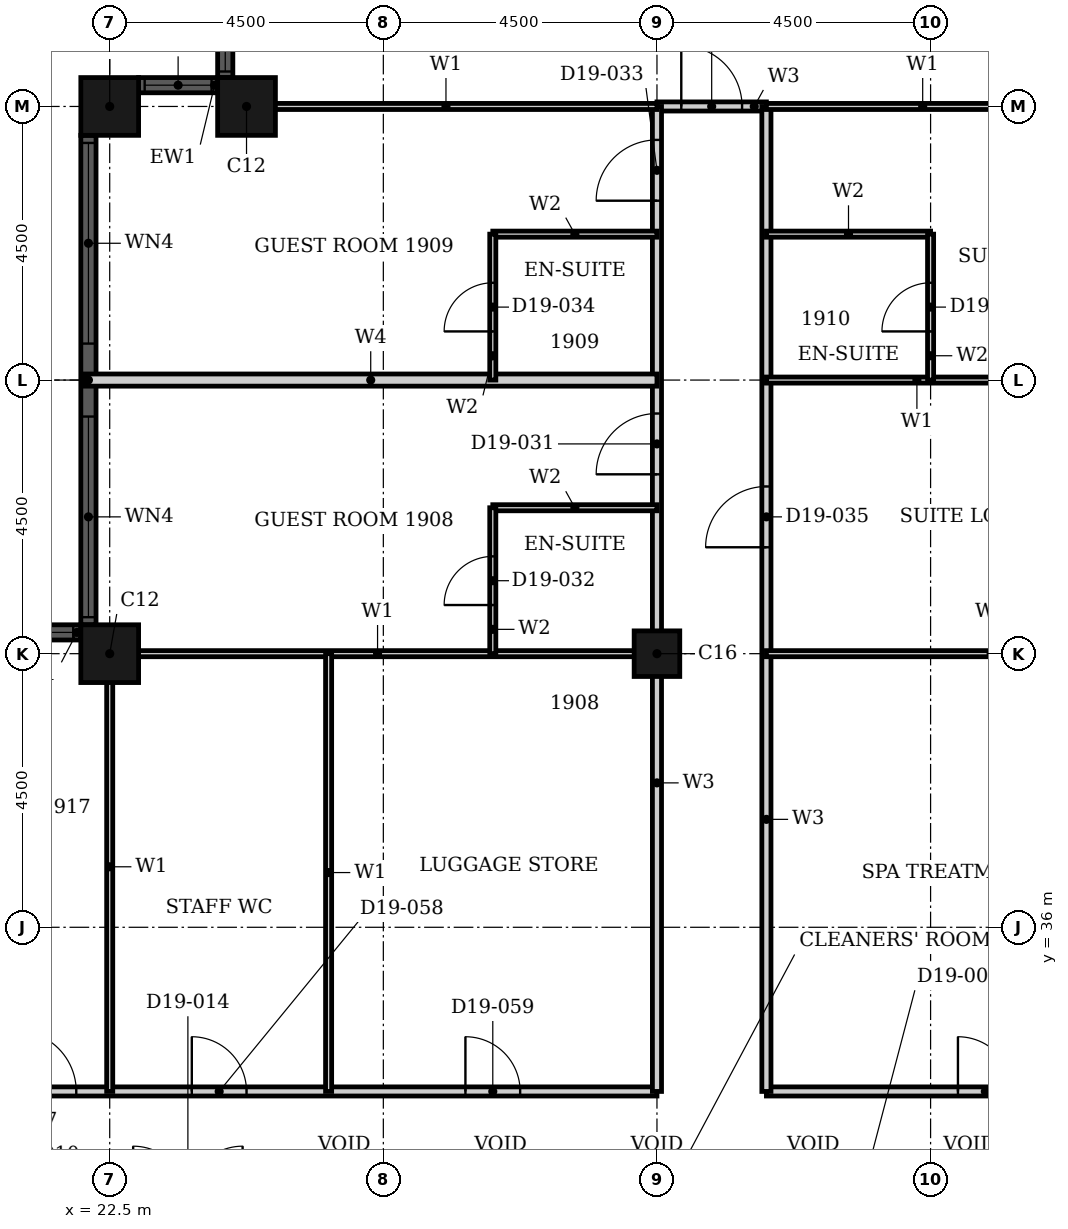
"""IFC4 building model, lengths in metres.
Left out: names, types, materials, properties, quantities, classifications, styles, units other than length and angle.
Written with IfcOpenShell. Run it as: python <this file> out.ifc"""

import sys

from ifc_helpers import new_model, si_unit, direction, frame, frame_2d, origin, origin_2d, place, context, subcontext, project, spatial, rectangle, hollow_rectangle, extrude, element, fill, save


model = new_model("IFC4")
c1 = context("Model", 3, precision=1e-05, world=origin(), true_north=direction((0.0, 1.0)))
c2 = subcontext(c1, "Body", "Model", "MODEL_VIEW")
j1 = project(units=[si_unit("LENGTHUNIT", "METRE"), si_unit("PLANEANGLEUNIT", "RADIAN")], contexts=[c1])
p1 = place(None, origin())
s1 = spatial("IfcSite", under=j1, at=p1, CompositionType="ELEMENT")
p2 = place(p1, origin())
s2 = spatial("IfcBuilding", under=s1, at=p2, CompositionType="ELEMENT")
p3 = place(p2, frame((0.0, 0.0, 81.6)))
s3 = spatial("IfcBuildingStorey", under=s2, at=p3, CompositionType="ELEMENT", Elevation=81.6)
for number, where, z_axis, x_axis in (
    (1, (24.75, 49.5, 0.0), (0.0, 0.0, 1.0), (1.0, 0.0, 0.0)),
    (2, (22.5, 49.5, 0.0), (0.0, 0.0, 1.0), (1.0, 0.0, 0.0)),
    (3, (22.5, 40.5, 0.0), (0.0, 0.0, 1.0), (1.0, 0.0, 0.0)),
):
    element("IfcColumn", number, at=place(p3, frame(where, z_axis=z_axis, x_axis=x_axis)), inside=s3, PredefinedType="COLUMN", context=c2, shape_type="SweptSolid", body=[
        extrude(hollow_rectangle(XDim=0.95, YDim=0.95, WallThickness=0.03, at=origin_2d()), origin(), (0.0, 0.0, 1.0), 3.6),
    ])
p4 = place(p3, frame((31.5, 40.5, 0.0), z_axis=(0.0, 0.0, 1.0), x_axis=(1.0, 0.0, 0.0)))
e4 = element("IfcColumn", 4, at=p4, inside=s3, PredefinedType="COLUMN", context=c2, shape_type="SweptSolid", body=[
    extrude(hollow_rectangle(XDim=0.75, YDim=0.75, WallThickness=0.024, at=origin_2d()), origin(), (0.0, 0.0, 1.0), 3.6),
])
p5 = place(p3, frame((24.4, 51.275, 0.0), z_axis=(0.0, 0.0, 1.0), x_axis=(0.0, -1.0, 0.0)))
e5 = element("IfcWall", 5, at=p5, inside=s3, PredefinedType="SOLIDWALL", context=c2, shape_type="SweptSolid", body=[
    extrude(rectangle(XDim=1.3, YDim=0.25, at=frame_2d((0.65, 0.0))), origin(), (0.0, 0.0, 1.0), 3.6),
])
p6 = place(p5, frame((0.1, 0.0, 0.9)))
e6 = element("IfcOpeningElement", 6, at=p6, cuts=e5, PredefinedType="OPENING", context=c2, shape_type="SweptSolid", body=[
    extrude(rectangle(XDim=1.1, YDim=2.08, at=frame_2d((0.55, 1.04))), frame((0.0, 0.135, 0.0), z_axis=(0.0, -1.0, 0.0), x_axis=(1.0, 0.0, 0.0)), (0.0, 0.0, 1.0), 0.27),
])
p7 = place(p3, frame((24.275, 49.85, 0.0), z_axis=(0.0, 0.0, 1.0), x_axis=(-1.0, 0.0, 0.0)))
e7 = element("IfcWall", 7, at=p7, inside=s3, PredefinedType="SOLIDWALL", context=c2, shape_type="SweptSolid", body=[
    extrude(rectangle(XDim=1.3, YDim=0.25, at=frame_2d((0.65, 0.0))), origin(), (0.0, 0.0, 1.0), 3.6),
])
p8 = place(p7, frame((0.1, 0.0, 0.9)))
e8 = element("IfcOpeningElement", 8, at=p8, cuts=e7, PredefinedType="OPENING", context=c2, shape_type="SweptSolid", body=[
    extrude(rectangle(XDim=1.1, YDim=2.08, at=frame_2d((0.55, 1.04))), frame((0.0, 0.135, 0.0), z_axis=(0.0, -1.0, 0.0), x_axis=(1.0, 0.0, 0.0)), (0.0, 0.0, 1.0), 0.27),
])
p9 = place(p3, frame((22.15, 49.025, 0.0), z_axis=(0.0, 0.0, 1.0), x_axis=(0.0, -1.0, 0.0)))
e9 = element("IfcWall", 9, at=p9, inside=s3, PredefinedType="SOLIDWALL", context=c2, shape_type="SweptSolid", body=[
    extrude(rectangle(XDim=8.05, YDim=0.25, at=frame_2d((4.025, 0.0))), origin(), (0.0, 0.0, 1.0), 3.6),
])
p10 = place(p9, frame((0.125, 0.0, 0.9)))
e10 = element("IfcOpeningElement", 10, at=p10, cuts=e9, PredefinedType="OPENING", context=c2, shape_type="SweptSolid", body=[
    extrude(rectangle(XDim=3.3, YDim=2.08, at=frame_2d((1.65, 1.04))), frame((0.0, 0.135, 0.0), z_axis=(0.0, -1.0, 0.0), x_axis=(1.0, 0.0, 0.0)), (0.0, 0.0, 1.0), 0.27),
])
p11 = place(p9, frame((4.625, 0.0, 0.9)))
e11 = element("IfcOpeningElement", 11, at=p11, cuts=e9, PredefinedType="OPENING", context=c2, shape_type="SweptSolid", body=[
    extrude(rectangle(XDim=3.3, YDim=2.08, at=frame_2d((1.65, 1.04))), frame((0.0, 0.135, 0.0), z_axis=(0.0, -1.0, 0.0), x_axis=(1.0, 0.0, 0.0)), (0.0, 0.0, 1.0), 0.27),
])
p12 = place(p3, frame((22.025, 40.85, 0.0), z_axis=(0.0, 0.0, 1.0), x_axis=(-1.0, 0.0, 0.0)))
e12 = element("IfcWall", 12, at=p12, inside=s3, PredefinedType="SOLIDWALL", context=c2, shape_type="SweptSolid", body=[
    extrude(rectangle(XDim=3.55, YDim=0.25, at=frame_2d((1.775, 0.0))), origin(), (0.0, 0.0, 1.0), 3.6),
])
p13 = place(p12, frame((0.125, 0.0, 0.9)))
e13 = element("IfcOpeningElement", 13, at=p13, cuts=e12, PredefinedType="OPENING", context=c2, shape_type="SweptSolid", body=[
    extrude(rectangle(XDim=3.3, YDim=2.08, at=frame_2d((1.65, 1.04))), frame((0.0, 0.135, 0.0), z_axis=(0.0, -1.0, 0.0), x_axis=(1.0, 0.0, 0.0)), (0.0, 0.0, 1.0), 0.27),
])
p14 = place(p3, frame((16.2, 33.3, 0.0), z_axis=(0.0, 0.0, 1.0), x_axis=(1.0, 0.0, 0.0)))
e14 = element("IfcWall", 14, at=p14, inside=s3, PredefinedType="PARTITIONING", context=c2, shape_type="SweptSolid", body=[
    extrude(rectangle(XDim=15.3, YDim=0.15, at=frame_2d((7.65, 0.0))), origin(), (0.0, 0.0, 1.0), 3.3),
])
p15 = place(p14, frame((4.75, 0.0, 0.0)))
e15 = element("IfcOpeningElement", 15, at=p15, cuts=e14, PredefinedType="OPENING", context=c2, shape_type="SweptSolid", body=[
    extrude(rectangle(XDim=1.0, YDim=2.1, at=frame_2d((0.5, 1.05))), frame((0.0, 0.085, 0.0), z_axis=(0.0, -1.0, 0.0), x_axis=(1.0, 0.0, 0.0)), (0.0, 0.0, 1.0), 0.17),
])
p16 = place(p14, frame((7.65, 0.0, 0.0)))
e16 = element("IfcOpeningElement", 16, at=p16, cuts=e14, PredefinedType="OPENING", context=c2, shape_type="SweptSolid", body=[
    extrude(rectangle(XDim=0.9, YDim=2.1, at=frame_2d((0.45, 1.05))), frame((0.0, 0.085, 0.0), z_axis=(0.0, -1.0, 0.0), x_axis=(1.0, 0.0, 0.0)), (0.0, 0.0, 1.0), 0.17),
])
p17 = place(p14, frame((12.15, 0.0, 0.0)))
e17 = element("IfcOpeningElement", 17, at=p17, cuts=e14, PredefinedType="OPENING", context=c2, shape_type="SweptSolid", body=[
    extrude(rectangle(XDim=0.9, YDim=2.1, at=frame_2d((0.45, 1.05))), frame((0.0, 0.085, 0.0), z_axis=(0.0, -1.0, 0.0), x_axis=(1.0, 0.0, 0.0)), (0.0, 0.0, 1.0), 0.17),
])
p18 = place(p3, frame((33.3, 33.3, 0.0), z_axis=(0.0, 0.0, 1.0), x_axis=(1.0, 0.0, 0.0)))
e18 = element("IfcWall", 18, at=p18, inside=s3, PredefinedType="PARTITIONING", context=c2, shape_type="SweptSolid", body=[
    extrude(rectangle(XDim=13.5, YDim=0.15, at=frame_2d((6.75, 0.0))), origin(), (0.0, 0.0, 1.0), 3.3),
])
p19 = place(p18, frame((10.15, 0.0, 0.0)))
e19 = element("IfcOpeningElement", 19, at=p19, cuts=e18, PredefinedType="OPENING", context=c2, shape_type="SweptSolid", body=[
    extrude(rectangle(XDim=1.0, YDim=2.1, at=frame_2d((0.5, 1.05))), frame((0.0, 0.085, 0.0), z_axis=(0.0, -1.0, 0.0), x_axis=(1.0, 0.0, 0.0)), (0.0, 0.0, 1.0), 0.17),
])
p20 = place(p18, frame((12.15, 0.0, 0.0)))
e20 = element("IfcOpeningElement", 20, at=p20, cuts=e18, PredefinedType="OPENING", context=c2, shape_type="SweptSolid", body=[
    extrude(rectangle(XDim=0.9, YDim=2.1, at=frame_2d((0.45, 1.05))), frame((0.0, 0.085, 0.0), z_axis=(0.0, -1.0, 0.0), x_axis=(1.0, 0.0, 0.0)), (0.0, 0.0, 1.0), 0.17),
])
p21 = place(p18, frame((3.15, 0.0, 0.0)))
e21 = element("IfcOpeningElement", 21, at=p21, cuts=e18, PredefinedType="OPENING", context=c2, shape_type="SweptSolid", body=[
    extrude(rectangle(XDim=0.9, YDim=2.1, at=frame_2d((0.45, 1.05))), frame((0.0, 0.085, 0.0), z_axis=(0.0, -1.0, 0.0), x_axis=(1.0, 0.0, 0.0)), (0.0, 0.0, 1.0), 0.17),
])
p22 = place(p3, frame((31.5, 49.5, 0.0), z_axis=(0.0, 0.0, 1.0), x_axis=(1.0, 0.0, 0.0)))
e22 = element("IfcWall", 22, at=p22, inside=s3, PredefinedType="PARTITIONING", context=c2, shape_type="SweptSolid", body=[
    extrude(rectangle(XDim=1.8, YDim=0.15, at=frame_2d((0.9, 0.0))), origin(), (0.0, 0.0, 1.0), 3.3),
])
p23 = place(p22, frame((0.4, 0.0, 0.0)))
e23 = element("IfcOpeningElement", 23, at=p23, cuts=e22, PredefinedType="OPENING", context=c2, shape_type="SweptSolid", body=[
    extrude(rectangle(XDim=1.0, YDim=2.1, at=frame_2d((0.5, 1.05))), frame((0.0, 0.085, 0.0), z_axis=(0.0, -1.0, 0.0), x_axis=(1.0, 0.0, 0.0)), (0.0, 0.0, 1.0), 0.17),
])
p24 = place(p3, frame((31.5, 33.3, 0.0), z_axis=(0.0, 0.0, 1.0), x_axis=(0.0, 1.0, 0.0)))
e24 = element("IfcWall", 24, at=p24, inside=s3, PredefinedType="PARTITIONING", context=c2, shape_type="SweptSolid", body=[
    extrude(rectangle(XDim=16.2, YDim=0.15, at=frame_2d((8.1, 0.0))), origin(), (0.0, 0.0, 1.0), 2.58),
])
p25 = place(p24, frame((10.15, 0.0, 0.0)))
e25 = element("IfcOpeningElement", 25, at=p25, cuts=e24, PredefinedType="OPENING", context=c2, shape_type="SweptSolid", body=[
    extrude(rectangle(XDim=1.0, YDim=2.1, at=frame_2d((0.5, 1.05))), frame((0.0, 0.085, 0.0), z_axis=(0.0, -1.0, 0.0), x_axis=(1.0, 0.0, 0.0)), (0.0, 0.0, 1.0), 0.17),
])
p26 = place(p24, frame((14.65, 0.0, 0.0)))
e26 = element("IfcOpeningElement", 26, at=p26, cuts=e24, PredefinedType="OPENING", context=c2, shape_type="SweptSolid", body=[
    extrude(rectangle(XDim=1.0, YDim=2.1, at=frame_2d((0.5, 1.05))), frame((0.0, 0.085, 0.0), z_axis=(0.0, -1.0, 0.0), x_axis=(1.0, 0.0, 0.0)), (0.0, 0.0, 1.0), 0.17),
])
p27 = place(p3, frame((33.3, 33.3, 0.0), z_axis=(0.0, 0.0, 1.0), x_axis=(0.0, 1.0, 0.0)))
e27 = element("IfcWall", 27, at=p27, inside=s3, PredefinedType="PARTITIONING", context=c2, shape_type="SweptSolid", body=[
    extrude(rectangle(XDim=16.2, YDim=0.15, at=frame_2d((8.1, 0.0))), origin(), (0.0, 0.0, 1.0), 3.3),
])
p28 = place(p27, frame((8.95, 0.0, 0.0)))
e28 = element("IfcOpeningElement", 28, at=p28, cuts=e27, PredefinedType="OPENING", context=c2, shape_type="SweptSolid", body=[
    extrude(rectangle(XDim=1.0, YDim=2.1, at=frame_2d((0.5, 1.05))), frame((0.0, 0.085, 0.0), z_axis=(0.0, -1.0, 0.0), x_axis=(1.0, 0.0, 0.0)), (0.0, 0.0, 1.0), 0.17),
])
p29 = place(p3, frame((22.31, 40.5, 0.0), z_axis=(0.0, 0.0, 1.0), x_axis=(1.0, 0.0, 0.0)))
e29 = element("IfcWall", 29, at=p29, inside=s3, PredefinedType="PARTITIONING", context=c2, shape_type="SweptSolid", body=[
    extrude(rectangle(XDim=9.19, YDim=0.1, at=frame_2d((4.595, 0.0))), origin(), (0.0, 0.0, 1.0), 2.38),
])
p30 = place(p3, frame((33.3, 40.5, 0.0), z_axis=(0.0, 0.0, 1.0), x_axis=(1.0, 0.0, 0.0)))
e30 = element("IfcWall", 30, at=p30, inside=s3, PredefinedType="PARTITIONING", context=c2, shape_type="SweptSolid", body=[
    extrude(rectangle(XDim=7.39, YDim=0.1, at=frame_2d((3.695, 0.0))), origin(), (0.0, 0.0, 1.0), 2.38),
])
p31 = place(p3, frame((33.3, 45.0, 0.0), z_axis=(0.0, 0.0, 1.0), x_axis=(1.0, 0.0, 0.0)))
e31 = element("IfcWall", 31, at=p31, inside=s3, PredefinedType="PARTITIONING", context=c2, shape_type="SweptSolid", body=[
    extrude(rectangle(XDim=7.615, YDim=0.1, at=frame_2d((3.808, 0.0))), origin(), (0.0, 0.0, 1.0), 3.3),
])
p32 = place(p31, frame((4.95, 0.0, 0.0)))
e32 = element("IfcOpeningElement", 32, at=p32, cuts=e31, PredefinedType="OPENING", context=c2, shape_type="SweptSolid", body=[
    extrude(rectangle(XDim=0.9, YDim=2.1, at=frame_2d((0.45, 1.05))), frame((0.0, 0.06, 0.0), z_axis=(0.0, -1.0, 0.0), x_axis=(1.0, 0.0, 0.0)), (0.0, 0.0, 1.0), 0.12),
])
p33 = place(p3, frame((24.56, 49.5, 0.0), z_axis=(0.0, 0.0, 1.0), x_axis=(1.0, 0.0, 0.0)))
e33 = element("IfcWall", 33, at=p33, inside=s3, PredefinedType="PARTITIONING", context=c2, shape_type="SweptSolid", body=[
    extrude(rectangle(XDim=6.94, YDim=0.1, at=frame_2d((3.47, 0.0))), origin(), (0.0, 0.0, 1.0), 3.3),
])
p34 = place(p3, frame((33.3, 49.5, 0.0), z_axis=(0.0, 0.0, 1.0), x_axis=(1.0, 0.0, 0.0)))
e34 = element("IfcWall", 34, at=p34, inside=s3, PredefinedType="PARTITIONING", context=c2, shape_type="SweptSolid", body=[
    extrude(rectangle(XDim=5.14, YDim=0.1, at=frame_2d((2.57, 0.0))), origin(), (0.0, 0.0, 1.0), 3.3),
])
p35 = place(p3, frame((22.5, 33.3, 0.0), z_axis=(0.0, 0.0, 1.0), x_axis=(0.0, 1.0, 0.0)))
e35 = element("IfcWall", 35, at=p35, inside=s3, PredefinedType="PARTITIONING", context=c2, shape_type="SweptSolid", body=[
    extrude(rectangle(XDim=7.39, YDim=0.1, at=frame_2d((3.695, 0.0))), origin(), (0.0, 0.0, 1.0), 3.3),
])
p36 = place(p3, frame((26.1, 33.3, 0.0), z_axis=(0.0, 0.0, 1.0), x_axis=(0.0, 1.0, 0.0)))
e36 = element("IfcWall", 36, at=p36, inside=s3, PredefinedType="PARTITIONING", context=c2, shape_type="SweptSolid", body=[
    extrude(rectangle(XDim=7.2, YDim=0.1, at=frame_2d((3.6, 0.0))), origin(), (0.0, 0.0, 1.0), 3.3),
])
p37 = place(p3, frame((22.085, 45.0, 0.0), z_axis=(0.0, 0.0, 1.0), x_axis=(1.0, 0.0, 0.0)))
e37 = element("IfcWall", 37, at=p37, inside=s3, PredefinedType="PARTITIONING", context=c2, shape_type="SweptSolid", body=[
    extrude(rectangle(XDim=9.415, YDim=0.2, at=frame_2d((4.708, 0.0))), origin(), (0.0, 0.0, 1.0), 3.3),
])
for number, where, z_axis, x_axis in (
    (38, (28.8, 42.9, 0.0), (0.0, 0.0, 1.0), (1.0, 0.0, 0.0)),
    (39, (28.8, 47.4, 0.0), (0.0, 0.0, 1.0), (1.0, 0.0, 0.0)),
    (40, (33.3, 47.4, 0.0), (0.0, 0.0, 1.0), (1.0, 0.0, 0.0)),
):
    element("IfcWall", number, at=place(p3, frame(where, z_axis=z_axis, x_axis=x_axis)), inside=s3, PredefinedType="PARTITIONING", context=c2, shape_type="SweptSolid", body=[
        extrude(rectangle(XDim=2.7, YDim=0.1, at=frame_2d((1.35, 0.0))), origin(), (0.0, 0.0, 1.0), 3.3),
    ])
p38 = place(p3, frame((28.8, 40.5, 0.0), z_axis=(0.0, 0.0, 1.0), x_axis=(0.0, 1.0, 0.0)))
e41 = element("IfcWall", 41, at=p38, inside=s3, PredefinedType="PARTITIONING", context=c2, shape_type="SweptSolid", body=[
    extrude(rectangle(XDim=2.4, YDim=0.1, at=frame_2d((1.2, 0.0))), origin(), (0.0, 0.0, 1.0), 3.3),
])
p39 = place(p38, frame((0.8, 0.0, 0.0)))
e42 = element("IfcOpeningElement", 42, at=p39, cuts=e41, PredefinedType="OPENING", context=c2, shape_type="SweptSolid", body=[
    extrude(rectangle(XDim=0.8, YDim=2.1, at=frame_2d((0.4, 1.05))), frame((0.0, 0.06, 0.0), z_axis=(0.0, -1.0, 0.0), x_axis=(1.0, 0.0, 0.0)), (0.0, 0.0, 1.0), 0.12),
])
p40 = place(p3, frame((28.8, 45.0, 0.0), z_axis=(0.0, 0.0, 1.0), x_axis=(0.0, 1.0, 0.0)))
e43 = element("IfcWall", 43, at=p40, inside=s3, PredefinedType="PARTITIONING", context=c2, shape_type="SweptSolid", body=[
    extrude(rectangle(XDim=2.4, YDim=0.1, at=frame_2d((1.2, 0.0))), origin(), (0.0, 0.0, 1.0), 3.3),
])
p41 = place(p40, frame((0.8, 0.0, 0.0)))
e44 = element("IfcOpeningElement", 44, at=p41, cuts=e43, PredefinedType="OPENING", context=c2, shape_type="SweptSolid", body=[
    extrude(rectangle(XDim=0.8, YDim=2.1, at=frame_2d((0.4, 1.05))), frame((0.0, 0.06, 0.0), z_axis=(0.0, -1.0, 0.0), x_axis=(1.0, 0.0, 0.0)), (0.0, 0.0, 1.0), 0.12),
])
p42 = place(p3, frame((36.0, 45.0, 0.0), z_axis=(0.0, 0.0, 1.0), x_axis=(0.0, 1.0, 0.0)))
e45 = element("IfcWall", 45, at=p42, inside=s3, PredefinedType="PARTITIONING", context=c2, shape_type="SweptSolid", body=[
    extrude(rectangle(XDim=2.4, YDim=0.1, at=frame_2d((1.2, 0.0))), origin(), (0.0, 0.0, 1.0), 2.58),
])
p43 = place(p42, frame((0.8, 0.0, 0.0)))
e46 = element("IfcOpeningElement", 46, at=p43, cuts=e45, PredefinedType="OPENING", context=c2, shape_type="SweptSolid", body=[
    extrude(rectangle(XDim=0.8, YDim=2.1, at=frame_2d((0.4, 1.05))), frame((0.0, 0.06, 0.0), z_axis=(0.0, -1.0, 0.0), x_axis=(1.0, 0.0, 0.0)), (0.0, 0.0, 1.0), 0.12),
])
p44 = place(p6, origin())
e47 = element("IfcWindow", 47, at=p44, inside=s3, PartitioningType="SINGLE_PANEL", PredefinedType="WINDOW", context=c2, shape_type="SweptSolid", body=[
    extrude(rectangle(XDim=1.1, YDim=2.08, at=frame_2d((0.55, 1.04))), frame((0.0, 0.03, 0.0), z_axis=(0.0, -1.0, 0.0), x_axis=(1.0, 0.0, 0.0)), (0.0, 0.0, 1.0), 0.06),
])
fill(e6, e47)
p45 = place(p8, origin())
e48 = element("IfcWindow", 48, at=p45, inside=s3, PartitioningType="SINGLE_PANEL", PredefinedType="WINDOW", context=c2, shape_type="SweptSolid", body=[
    extrude(rectangle(XDim=1.1, YDim=2.08, at=frame_2d((0.55, 1.04))), frame((0.0, 0.03, 0.0), z_axis=(0.0, -1.0, 0.0), x_axis=(1.0, 0.0, 0.0)), (0.0, 0.0, 1.0), 0.06),
])
fill(e8, e48)
p46 = place(p10, origin())
e49 = element("IfcWindow", 49, at=p46, inside=s3, PartitioningType="SINGLE_PANEL", PredefinedType="WINDOW", context=c2, shape_type="SweptSolid", body=[
    extrude(rectangle(XDim=3.3, YDim=2.08, at=frame_2d((1.65, 1.04))), frame((0.0, 0.03, 0.0), z_axis=(0.0, -1.0, 0.0), x_axis=(1.0, 0.0, 0.0)), (0.0, 0.0, 1.0), 0.06),
])
fill(e10, e49)
p47 = place(p11, origin())
e50 = element("IfcWindow", 50, at=p47, inside=s3, PartitioningType="SINGLE_PANEL", PredefinedType="WINDOW", context=c2, shape_type="SweptSolid", body=[
    extrude(rectangle(XDim=3.3, YDim=2.08, at=frame_2d((1.65, 1.04))), frame((0.0, 0.03, 0.0), z_axis=(0.0, -1.0, 0.0), x_axis=(1.0, 0.0, 0.0)), (0.0, 0.0, 1.0), 0.06),
])
fill(e11, e50)
p48 = place(p13, origin())
e51 = element("IfcWindow", 51, at=p48, inside=s3, PartitioningType="SINGLE_PANEL", PredefinedType="WINDOW", context=c2, shape_type="SweptSolid", body=[
    extrude(rectangle(XDim=3.3, YDim=2.08, at=frame_2d((1.65, 1.04))), frame((0.0, 0.03, 0.0), z_axis=(0.0, -1.0, 0.0), x_axis=(1.0, 0.0, 0.0)), (0.0, 0.0, 1.0), 0.06),
])
fill(e13, e51)
p49 = place(p25, origin())
e52 = element("IfcDoor", 52, at=p49, inside=s3, OperationType="SINGLE_SWING_RIGHT", PredefinedType="DOOR", context=c2, shape_type="SweptSolid", body=[
    extrude(rectangle(XDim=1.0, YDim=2.1, at=frame_2d((0.5, 1.05))), frame((0.0, 0.025, 0.0), z_axis=(0.0, -1.0, 0.0), x_axis=(1.0, 0.0, 0.0)), (0.0, 0.0, 1.0), 0.05),
])
fill(e25, e52)
p50 = place(p39, origin())
e53 = element("IfcDoor", 53, at=p50, inside=s3, OperationType="SINGLE_SWING_RIGHT", PredefinedType="DOOR", context=c2, shape_type="SweptSolid", body=[
    extrude(rectangle(XDim=0.8, YDim=2.1, at=frame_2d((0.4, 1.05))), frame((0.0, 0.025, 0.0), z_axis=(0.0, -1.0, 0.0), x_axis=(1.0, 0.0, 0.0)), (0.0, 0.0, 1.0), 0.05),
])
fill(e42, e53)
p51 = place(p26, origin())
e54 = element("IfcDoor", 54, at=p51, inside=s3, OperationType="SINGLE_SWING_RIGHT", PredefinedType="DOOR", context=c2, shape_type="SweptSolid", body=[
    extrude(rectangle(XDim=1.0, YDim=2.1, at=frame_2d((0.5, 1.05))), frame((0.0, 0.025, 0.0), z_axis=(0.0, -1.0, 0.0), x_axis=(1.0, 0.0, 0.0)), (0.0, 0.0, 1.0), 0.05),
])
fill(e26, e54)
p52 = place(p41, origin())
e55 = element("IfcDoor", 55, at=p52, inside=s3, OperationType="SINGLE_SWING_RIGHT", PredefinedType="DOOR", context=c2, shape_type="SweptSolid", body=[
    extrude(rectangle(XDim=0.8, YDim=2.1, at=frame_2d((0.4, 1.05))), frame((0.0, 0.025, 0.0), z_axis=(0.0, -1.0, 0.0), x_axis=(1.0, 0.0, 0.0)), (0.0, 0.0, 1.0), 0.05),
])
fill(e44, e55)
p53 = place(p28, origin())
e56 = element("IfcDoor", 56, at=p53, inside=s3, OperationType="SINGLE_SWING_RIGHT", PredefinedType="DOOR", context=c2, shape_type="SweptSolid", body=[
    extrude(rectangle(XDim=1.0, YDim=2.1, at=frame_2d((0.5, 1.05))), frame((0.0, 0.025, 0.0), z_axis=(0.0, -1.0, 0.0), x_axis=(1.0, 0.0, 0.0)), (0.0, 0.0, 1.0), 0.05),
])
fill(e28, e56)
p54 = place(p43, origin())
e57 = element("IfcDoor", 57, at=p54, inside=s3, OperationType="SINGLE_SWING_RIGHT", PredefinedType="DOOR", context=c2, shape_type="SweptSolid", body=[
    extrude(rectangle(XDim=0.8, YDim=2.1, at=frame_2d((0.4, 1.05))), frame((0.0, 0.025, 0.0), z_axis=(0.0, -1.0, 0.0), x_axis=(1.0, 0.0, 0.0)), (0.0, 0.0, 1.0), 0.05),
])
fill(e46, e57)
p55 = place(p23, origin())
e58 = element("IfcDoor", 58, at=p55, inside=s3, OperationType="SINGLE_SWING_LEFT", PredefinedType="DOOR", context=c2, shape_type="SweptSolid", body=[
    extrude(rectangle(XDim=1.0, YDim=2.1, at=frame_2d((0.5, 1.05))), frame((0.0, 0.025, 0.0), z_axis=(0.0, -1.0, 0.0), x_axis=(1.0, 0.0, 0.0)), (0.0, 0.0, 1.0), 0.05),
])
fill(e23, e58)
p56 = place(p15, origin())
e59 = element("IfcDoor", 59, at=p56, inside=s3, OperationType="SINGLE_SWING_RIGHT", PredefinedType="DOOR", context=c2, shape_type="SweptSolid", body=[
    extrude(rectangle(XDim=1.0, YDim=2.1, at=frame_2d((0.5, 1.05))), frame((0.0, 0.025, 0.0), z_axis=(0.0, -1.0, 0.0), x_axis=(1.0, 0.0, 0.0)), (0.0, 0.0, 1.0), 0.05),
])
fill(e15, e59)
p57 = place(p16, origin())
e60 = element("IfcDoor", 60, at=p57, inside=s3, OperationType="SINGLE_SWING_LEFT", PredefinedType="DOOR", context=c2, shape_type="SweptSolid", body=[
    extrude(rectangle(XDim=0.9, YDim=2.1, at=frame_2d((0.45, 1.05))), frame((0.0, 0.025, 0.0), z_axis=(0.0, -1.0, 0.0), x_axis=(1.0, 0.0, 0.0)), (0.0, 0.0, 1.0), 0.05),
])
fill(e16, e60)
p58 = place(p17, origin())
e61 = element("IfcDoor", 61, at=p58, inside=s3, OperationType="SINGLE_SWING_RIGHT", PredefinedType="DOOR", context=c2, shape_type="SweptSolid", body=[
    extrude(rectangle(XDim=0.9, YDim=2.1, at=frame_2d((0.45, 1.05))), frame((0.0, 0.025, 0.0), z_axis=(0.0, -1.0, 0.0), x_axis=(1.0, 0.0, 0.0)), (0.0, 0.0, 1.0), 0.05),
])
fill(e17, e61)
p59 = place(p21, origin())
e62 = element("IfcDoor", 62, at=p59, inside=s3, OperationType="SINGLE_SWING_RIGHT", PredefinedType="DOOR", context=c2, shape_type="SweptSolid", body=[
    extrude(rectangle(XDim=0.9, YDim=2.1, at=frame_2d((0.45, 1.05))), frame((0.0, 0.025, 0.0), z_axis=(0.0, -1.0, 0.0), x_axis=(1.0, 0.0, 0.0)), (0.0, 0.0, 1.0), 0.05),
])
fill(e21, e62)
save(model, sys.argv[1])
